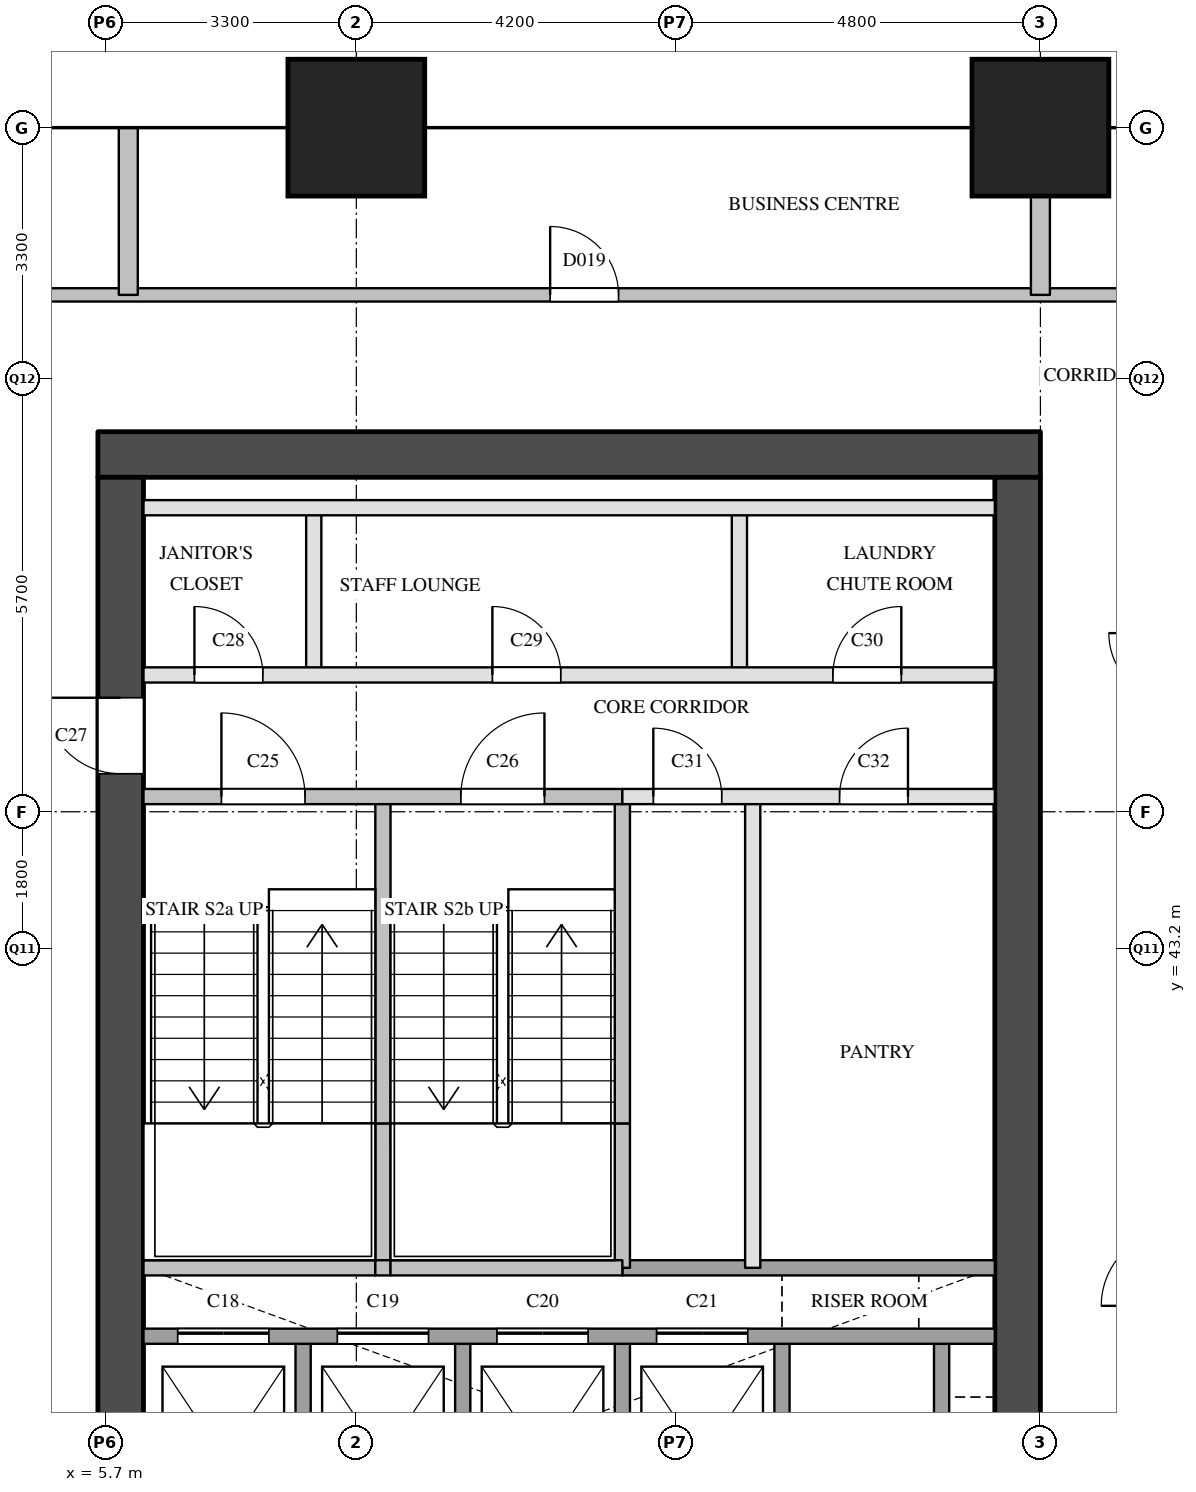
"""IFC4 building model, lengths in metres.
Left out: names, types, materials, properties, quantities, classifications, styles, units other than length and angle.
Written with IfcOpenShell. Run it as: python <this file> out.ifc"""

import sys

from ifc_helpers import new_model, si_unit, direction, frame, frame_2d, origin, origin_2d, place, context, subcontext, project, spatial, rectangle, extrude, element, fill, save


model = new_model("IFC4")
c1 = context("Model", 3, precision=1e-05, world=origin(), true_north=direction((0.0, 1.0)))
c2 = subcontext(c1, "Body", "Model", "MODEL_VIEW")
j1 = project(units=[si_unit("LENGTHUNIT", "METRE"), si_unit("PLANEANGLEUNIT", "RADIAN")], contexts=[c1])
p1 = place(None, origin())
s1 = spatial("IfcSite", under=j1, at=p1, CompositionType="ELEMENT")
p2 = place(p1, origin())
s2 = spatial("IfcBuilding", under=s1, at=p2, CompositionType="ELEMENT")
p3 = place(p2, frame((0.0, 0.0, 115.8)))
s3 = spatial("IfcBuildingStorey", under=s2, at=p3, CompositionType="ELEMENT", Elevation=115.8)
for number, where, z_axis, x_axis in (
    (1, (9.0, 54.0, 0.0), (0.0, 0.0, 1.0), (1.0, 0.0, 0.0)),
    (2, (18.0, 54.0, 0.0), (0.0, 0.0, 1.0), (1.0, 0.0, 0.0)),
):
    element("IfcColumn", number, at=place(p3, frame(where, z_axis=z_axis, x_axis=x_axis)), inside=s3, PredefinedType="COLUMN", context=c2, shape_type="SweptSolid", body=[
        extrude(rectangle(XDim=1.8, YDim=1.8, at=origin_2d()), origin(), (0.0, 0.0, 1.0), 3.8),
    ])
p4 = place(p3, frame((5.6, 49.7, 0.0), z_axis=(0.0, 0.0, 1.0), x_axis=(1.0, 0.0, 0.0)))
e3 = element("IfcWall", 3, at=p4, inside=s3, PredefinedType="SHEAR", context=c2, shape_type="SweptSolid", body=[
    extrude(rectangle(XDim=12.4, YDim=0.6, at=frame_2d((6.2, 0.0))), origin(), (0.0, 0.0, 1.0), 3.5),
])
p5 = place(p3, frame((5.9, 29.1, 0.0), z_axis=(0.0, 0.0, 1.0), x_axis=(0.0, 1.0, 0.0)))
e4 = element("IfcWall", 4, at=p5, inside=s3, PredefinedType="SHEAR", context=c2, shape_type="SweptSolid", body=[
    extrude(rectangle(XDim=20.3, YDim=0.6, at=frame_2d((10.15, 0.0))), origin(), (0.0, 0.0, 1.0), 3.5),
])
p6 = place(p5, frame((3.6, 0.0, 0.0)))
e5 = element("IfcOpeningElement", 5, at=p6, cuts=e4, PredefinedType="OPENING", context=c2, shape_type="SweptSolid", body=[
    extrude(rectangle(XDim=1.8, YDim=2.1, at=frame_2d((0.9, 1.05))), frame((0.0, 0.31, 0.0), z_axis=(0.0, -1.0, 0.0), x_axis=(1.0, 0.0, 0.0)), (0.0, 0.0, 1.0), 0.62),
])
p7 = place(p5, frame((16.4, 0.0, 0.0)))
e6 = element("IfcOpeningElement", 6, at=p7, cuts=e4, PredefinedType="OPENING", context=c2, shape_type="SweptSolid", body=[
    extrude(rectangle(XDim=1.0, YDim=2.1, at=frame_2d((0.5, 1.05))), frame((0.0, 0.31, 0.0), z_axis=(0.0, -1.0, 0.0), x_axis=(1.0, 0.0, 0.0)), (0.0, 0.0, 1.0), 0.62),
])
p8 = place(p3, frame((17.7, 29.1, 0.0), z_axis=(0.0, 0.0, 1.0), x_axis=(0.0, 1.0, 0.0)))
e7 = element("IfcWall", 7, at=p8, inside=s3, PredefinedType="SHEAR", context=c2, shape_type="SweptSolid", body=[
    extrude(rectangle(XDim=20.3, YDim=0.6, at=frame_2d((10.15, 0.0))), origin(), (0.0, 0.0, 1.0), 3.5),
])
p9 = place(p8, frame((1.25, 0.0, 0.0)))
e8 = element("IfcOpeningElement", 8, at=p9, cuts=e7, PredefinedType="OPENING", context=c2, shape_type="SweptSolid", body=[
    extrude(rectangle(XDim=0.7, YDim=2.1, at=frame_2d((0.35, 1.05))), frame((0.0, 0.31, 0.0), z_axis=(0.0, -1.0, 0.0), x_axis=(1.0, 0.0, 0.0)), (0.0, 0.0, 1.0), 0.62),
])
p10 = place(p8, frame((7.05, 0.0, 0.0)))
e9 = element("IfcOpeningElement", 9, at=p10, cuts=e7, PredefinedType="OPENING", context=c2, shape_type="SweptSolid", body=[
    extrude(rectangle(XDim=0.7, YDim=2.1, at=frame_2d((0.35, 1.05))), frame((0.0, 0.31, 0.0), z_axis=(0.0, -1.0, 0.0), x_axis=(1.0, 0.0, 0.0)), (0.0, 0.0, 1.0), 0.62),
])
p11 = place(p3, frame((8.3, 34.9, 0.0), z_axis=(0.0, 0.0, 1.0), x_axis=(0.0, 1.0, 0.0)))
e10 = element("IfcWall", 10, at=p11, inside=s3, PredefinedType="SOLIDWALL", context=c2, shape_type="SweptSolid", body=[
    extrude(rectangle(XDim=3.2, YDim=0.2, at=frame_2d((1.6, 0.0))), origin(), (0.0, 0.0, 1.0), 3.5),
])
p12 = place(p3, frame((8.44, 46.8, 0.0), z_axis=(0.0, 0.0, 1.0), x_axis=(0.0, 1.0, 0.0)))
e11 = element("IfcWall", 11, at=p12, inside=s3, PredefinedType="PARTITIONING", context=c2, shape_type="SweptSolid", body=[
    extrude(rectangle(XDim=2.2, YDim=0.2, at=frame_2d((1.1, 0.0))), origin(), (0.0, 0.0, 1.0), 3.5),
])
p13 = place(p3, frame((9.35, 39.0, 0.0), z_axis=(0.0, 0.0, 1.0), x_axis=(0.0, 1.0, 0.0)))
e12 = element("IfcWall", 12, at=p13, inside=s3, PredefinedType="SOLIDWALL", context=c2, shape_type="SweptSolid", body=[
    extrude(rectangle(XDim=1.9, YDim=0.2, at=frame_2d((0.95, 0.0))), origin(), (0.0, 0.0, 1.0), 3.5),
])
p14 = place(p3, frame((9.35, 40.9, 0.0), z_axis=(0.0, 0.0, 1.0), x_axis=(0.0, 1.0, 0.0)))
e13 = element("IfcWall", 13, at=p14, inside=s3, PredefinedType="SOLIDWALL", context=c2, shape_type="SweptSolid", body=[
    extrude(rectangle(XDim=4.3, YDim=0.2, at=frame_2d((2.15, 0.0))), origin(), (0.0, 0.0, 1.0), 3.5),
])
for number, where, z_axis, x_axis in (
    (14, (10.4, 34.9, 0.0), (0.0, 0.0, 1.0), (0.0, 1.0, 0.0)),
    (15, (12.5, 34.9, 0.0), (0.0, 0.0, 1.0), (0.0, 1.0, 0.0)),
):
    element("IfcWall", number, at=place(p3, frame(where, z_axis=z_axis, x_axis=x_axis)), inside=s3, PredefinedType="SOLIDWALL", context=c2, shape_type="SweptSolid", body=[
        extrude(rectangle(XDim=3.2, YDim=0.2, at=frame_2d((1.6, 0.0))), origin(), (0.0, 0.0, 1.0), 3.5),
    ])
p15 = place(p3, frame((12.5, 39.0, 0.0), z_axis=(0.0, 0.0, 1.0), x_axis=(0.0, 1.0, 0.0)))
e16 = element("IfcWall", 16, at=p15, inside=s3, PredefinedType="SOLIDWALL", context=c2, shape_type="SweptSolid", body=[
    extrude(rectangle(XDim=1.9, YDim=0.2, at=frame_2d((0.95, 0.0))), origin(), (0.0, 0.0, 1.0), 3.5),
])
p16 = place(p3, frame((12.5, 40.9, 0.0), z_axis=(0.0, 0.0, 1.0), x_axis=(0.0, 1.0, 0.0)))
e17 = element("IfcWall", 17, at=p16, inside=s3, PredefinedType="SOLIDWALL", context=c2, shape_type="SweptSolid", body=[
    extrude(rectangle(XDim=4.3, YDim=0.2, at=frame_2d((2.15, 0.0))), origin(), (0.0, 0.0, 1.0), 3.5),
])
p17 = place(p3, frame((14.04, 46.8, 0.0), z_axis=(0.0, 0.0, 1.0), x_axis=(0.0, 1.0, 0.0)))
e18 = element("IfcWall", 18, at=p17, inside=s3, PredefinedType="PARTITIONING", context=c2, shape_type="SweptSolid", body=[
    extrude(rectangle(XDim=2.2, YDim=0.2, at=frame_2d((1.1, 0.0))), origin(), (0.0, 0.0, 1.0), 3.5),
])
p18 = place(p3, frame((14.215, 39.0, 0.0), z_axis=(0.0, 0.0, 1.0), x_axis=(0.0, 1.0, 0.0)))
e19 = element("IfcWall", 19, at=p18, inside=s3, PredefinedType="PARTITIONING", context=c2, shape_type="SweptSolid", body=[
    extrude(rectangle(XDim=6.2, YDim=0.2, at=frame_2d((3.1, 0.0))), origin(), (0.0, 0.0, 1.0), 3.5),
])
for number, where, z_axis, x_axis in (
    (20, (14.6, 34.9, 0.0), (0.0, 0.0, 1.0), (0.0, 1.0, 0.0)),
    (21, (16.7, 34.9, 0.0), (0.0, 0.0, 1.0), (0.0, 1.0, 0.0)),
):
    element("IfcWall", number, at=place(p3, frame(where, z_axis=z_axis, x_axis=x_axis)), inside=s3, PredefinedType="SOLIDWALL", context=c2, shape_type="SweptSolid", body=[
        extrude(rectangle(XDim=3.2, YDim=0.2, at=frame_2d((1.6, 0.0))), origin(), (0.0, 0.0, 1.0), 3.5),
    ])
p19 = place(p3, frame((6.2, 38.1, 0.0), z_axis=(0.0, 0.0, 1.0), x_axis=(1.0, 0.0, 0.0)))
e22 = element("IfcWall", 22, at=p19, inside=s3, PredefinedType="SOLIDWALL", context=c2, shape_type="SweptSolid", body=[
    extrude(rectangle(XDim=11.2, YDim=0.2, at=frame_2d((5.6, 0.0))), origin(), (0.0, 0.0, 1.0), 3.5),
])
p20 = place(p19, frame((0.45, 0.0, 0.0)))
e23 = element("IfcOpeningElement", 23, at=p20, cuts=e22, PredefinedType="OPENING", context=c2, shape_type="SweptSolid", body=[
    extrude(rectangle(XDim=1.2, YDim=2.1, at=frame_2d((0.6, 1.05))), frame((0.0, 0.11, 0.0), z_axis=(0.0, -1.0, 0.0), x_axis=(1.0, 0.0, 0.0)), (0.0, 0.0, 1.0), 0.22),
])
p21 = place(p19, frame((2.55, 0.0, 0.0)))
e24 = element("IfcOpeningElement", 24, at=p21, cuts=e22, PredefinedType="OPENING", context=c2, shape_type="SweptSolid", body=[
    extrude(rectangle(XDim=1.2, YDim=2.1, at=frame_2d((0.6, 1.05))), frame((0.0, 0.11, 0.0), z_axis=(0.0, -1.0, 0.0), x_axis=(1.0, 0.0, 0.0)), (0.0, 0.0, 1.0), 0.22),
])
p22 = place(p19, frame((4.65, 0.0, 0.0)))
e25 = element("IfcOpeningElement", 25, at=p22, cuts=e22, PredefinedType="OPENING", context=c2, shape_type="SweptSolid", body=[
    extrude(rectangle(XDim=1.2, YDim=2.1, at=frame_2d((0.6, 1.05))), frame((0.0, 0.11, 0.0), z_axis=(0.0, -1.0, 0.0), x_axis=(1.0, 0.0, 0.0)), (0.0, 0.0, 1.0), 0.22),
])
p23 = place(p19, frame((6.75, 0.0, 0.0)))
e26 = element("IfcOpeningElement", 26, at=p23, cuts=e22, PredefinedType="OPENING", context=c2, shape_type="SweptSolid", body=[
    extrude(rectangle(XDim=1.2, YDim=2.1, at=frame_2d((0.6, 1.05))), frame((0.0, 0.11, 0.0), z_axis=(0.0, -1.0, 0.0), x_axis=(1.0, 0.0, 0.0)), (0.0, 0.0, 1.0), 0.22),
])
p24 = place(p3, frame((12.5, 39.0, 0.0), z_axis=(0.0, 0.0, 1.0), x_axis=(1.0, 0.0, 0.0)))
e27 = element("IfcWall", 27, at=p24, inside=s3, PredefinedType="SOLIDWALL", context=c2, shape_type="SweptSolid", body=[
    extrude(rectangle(XDim=4.9, YDim=0.2, at=frame_2d((2.45, 0.0))), origin(), (0.0, 0.0, 1.0), 3.5),
])
p25 = place(p3, frame((6.2, 39.0, 0.0), z_axis=(0.0, 0.0, 1.0), x_axis=(1.0, 0.0, 0.0)))
e28 = element("IfcWall", 28, at=p25, inside=s3, PredefinedType="SOLIDWALL", context=c2, shape_type="SweptSolid", body=[
    extrude(rectangle(XDim=3.05, YDim=0.2, at=frame_2d((1.525, 0.0))), origin(), (0.0, 0.0, 1.0), 3.5),
])
p26 = place(p3, frame((9.25, 39.0, 0.0), z_axis=(0.0, 0.0, 1.0), x_axis=(1.0, 0.0, 0.0)))
e29 = element("IfcWall", 29, at=p26, inside=s3, PredefinedType="SOLIDWALL", context=c2, shape_type="SweptSolid", body=[
    extrude(rectangle(XDim=0.2, YDim=0.2, at=frame_2d((0.1, 0.0))), origin(), (0.0, 0.0, 1.0), 3.5),
])
p27 = place(p3, frame((9.45, 39.0, 0.0), z_axis=(0.0, 0.0, 1.0), x_axis=(1.0, 0.0, 0.0)))
e30 = element("IfcWall", 30, at=p27, inside=s3, PredefinedType="SOLIDWALL", context=c2, shape_type="SweptSolid", body=[
    extrude(rectangle(XDim=3.05, YDim=0.2, at=frame_2d((1.525, 0.0))), origin(), (0.0, 0.0, 1.0), 3.5),
])
p28 = place(p3, frame((12.5, 45.2, 0.0), z_axis=(0.0, 0.0, 1.0), x_axis=(1.0, 0.0, 0.0)))
e31 = element("IfcWall", 31, at=p28, inside=s3, PredefinedType="PARTITIONING", context=c2, shape_type="SweptSolid", body=[
    extrude(rectangle(XDim=4.9, YDim=0.2, at=frame_2d((2.45, 0.0))), origin(), (0.0, 0.0, 1.0), 3.5),
])
p29 = place(p28, frame((0.407, 0.0, 0.0)))
e32 = element("IfcOpeningElement", 32, at=p29, cuts=e31, PredefinedType="OPENING", context=c2, shape_type="SweptSolid", body=[
    extrude(rectangle(XDim=0.9, YDim=2.1, at=frame_2d((0.45, 1.05))), frame((0.0, 0.11, 0.0), z_axis=(0.0, -1.0, 0.0), x_axis=(1.0, 0.0, 0.0)), (0.0, 0.0, 1.0), 0.22),
])
p30 = place(p28, frame((2.857, 0.0, 0.0)))
e33 = element("IfcOpeningElement", 33, at=p30, cuts=e31, PredefinedType="OPENING", context=c2, shape_type="SweptSolid", body=[
    extrude(rectangle(XDim=0.9, YDim=2.1, at=frame_2d((0.45, 1.05))), frame((0.0, 0.11, 0.0), z_axis=(0.0, -1.0, 0.0), x_axis=(1.0, 0.0, 0.0)), (0.0, 0.0, 1.0), 0.22),
])
p31 = place(p3, frame((6.2, 45.2, 0.0), z_axis=(0.0, 0.0, 1.0), x_axis=(1.0, 0.0, 0.0)))
e34 = element("IfcWall", 34, at=p31, inside=s3, PredefinedType="SOLIDWALL", context=c2, shape_type="SweptSolid", body=[
    extrude(rectangle(XDim=6.3, YDim=0.2, at=frame_2d((3.15, 0.0))), origin(), (0.0, 0.0, 1.0), 3.5),
])
p32 = place(p31, frame((1.025, 0.0, 0.0)))
e35 = element("IfcOpeningElement", 35, at=p32, cuts=e34, PredefinedType="OPENING", context=c2, shape_type="SweptSolid", body=[
    extrude(rectangle(XDim=1.1, YDim=2.1, at=frame_2d((0.55, 1.05))), frame((0.0, 0.11, 0.0), z_axis=(0.0, -1.0, 0.0), x_axis=(1.0, 0.0, 0.0)), (0.0, 0.0, 1.0), 0.22),
])
p33 = place(p31, frame((4.175, 0.0, 0.0)))
e36 = element("IfcOpeningElement", 36, at=p33, cuts=e34, PredefinedType="OPENING", context=c2, shape_type="SweptSolid", body=[
    extrude(rectangle(XDim=1.1, YDim=2.1, at=frame_2d((0.55, 1.05))), frame((0.0, 0.11, 0.0), z_axis=(0.0, -1.0, 0.0), x_axis=(1.0, 0.0, 0.0)), (0.0, 0.0, 1.0), 0.22),
])
p34 = place(p3, frame((6.2, 46.8, 0.0), z_axis=(0.0, 0.0, 1.0), x_axis=(1.0, 0.0, 0.0)))
e37 = element("IfcWall", 37, at=p34, inside=s3, PredefinedType="PARTITIONING", context=c2, shape_type="SweptSolid", body=[
    extrude(rectangle(XDim=11.2, YDim=0.2, at=frame_2d((5.6, 0.0))), origin(), (0.0, 0.0, 1.0), 3.5),
])
p35 = place(p34, frame((0.67, 0.0, 0.0)))
e38 = element("IfcOpeningElement", 38, at=p35, cuts=e37, PredefinedType="OPENING", context=c2, shape_type="SweptSolid", body=[
    extrude(rectangle(XDim=0.9, YDim=2.1, at=frame_2d((0.45, 1.05))), frame((0.0, 0.11, 0.0), z_axis=(0.0, -1.0, 0.0), x_axis=(1.0, 0.0, 0.0)), (0.0, 0.0, 1.0), 0.22),
])
p36 = place(p34, frame((4.59, 0.0, 0.0)))
e39 = element("IfcOpeningElement", 39, at=p36, cuts=e37, PredefinedType="OPENING", context=c2, shape_type="SweptSolid", body=[
    extrude(rectangle(XDim=0.9, YDim=2.1, at=frame_2d((0.45, 1.05))), frame((0.0, 0.11, 0.0), z_axis=(0.0, -1.0, 0.0), x_axis=(1.0, 0.0, 0.0)), (0.0, 0.0, 1.0), 0.22),
])
p37 = place(p34, frame((9.07, 0.0, 0.0)))
e40 = element("IfcOpeningElement", 40, at=p37, cuts=e37, PredefinedType="OPENING", context=c2, shape_type="SweptSolid", body=[
    extrude(rectangle(XDim=0.9, YDim=2.1, at=frame_2d((0.45, 1.05))), frame((0.0, 0.11, 0.0), z_axis=(0.0, -1.0, 0.0), x_axis=(1.0, 0.0, 0.0)), (0.0, 0.0, 1.0), 0.22),
])
p38 = place(p3, frame((6.2, 49.0, 0.0), z_axis=(0.0, 0.0, 1.0), x_axis=(1.0, 0.0, 0.0)))
e41 = element("IfcWall", 41, at=p38, inside=s3, PredefinedType="PARTITIONING", context=c2, shape_type="SweptSolid", body=[
    extrude(rectangle(XDim=11.2, YDim=0.2, at=frame_2d((5.6, 0.0))), origin(), (0.0, 0.0, 1.0), 3.5),
])
p39 = place(p3, frame((3.8, 51.8, 0.0), z_axis=(0.0, 0.0, 1.0), x_axis=(1.0, 0.0, 0.0)))
e42 = element("IfcWall", 42, at=p39, inside=s3, PredefinedType="PARTITIONING", context=c2, shape_type="SweptSolid", body=[
    extrude(rectangle(XDim=16.0, YDim=0.175, at=frame_2d((8.0, 0.0))), origin(), (0.0, 0.0, 1.0), 3.5),
])
p40 = place(p39, frame((7.75, 0.0, 0.0)))
e43 = element("IfcOpeningElement", 43, at=p40, cuts=e42, PredefinedType="OPENING", context=c2, shape_type="SweptSolid", body=[
    extrude(rectangle(XDim=0.9, YDim=2.1, at=frame_2d((0.45, 1.05))), frame((0.0, 0.097, 0.0), z_axis=(0.0, -1.0, 0.0), x_axis=(1.0, 0.0, 0.0)), (0.0, 0.0, 1.0), 0.195),
])
p41 = place(p3, frame((6.0, 51.8, 0.0), z_axis=(0.0, 0.0, 1.0), x_axis=(0.0, 1.0, 0.0)))
e44 = element("IfcWall", 44, at=p41, inside=s3, PredefinedType="PARTITIONING", context=c2, shape_type="SweptSolid", body=[
    extrude(rectangle(XDim=2.2, YDim=0.25, at=frame_2d((1.1, 0.0))), origin(), (0.0, 0.0, 1.0), 2.5),
])
p42 = place(p3, frame((18.0, 51.8, 0.0), z_axis=(0.0, 0.0, 1.0), x_axis=(0.0, 1.0, 0.0)))
e45 = element("IfcWall", 45, at=p42, inside=s3, PredefinedType="PARTITIONING", context=c2, shape_type="SweptSolid", body=[
    extrude(rectangle(XDim=2.2, YDim=0.25, at=frame_2d((1.1, 0.0))), origin(), (0.0, 0.0, 1.0), 3.5),
])
p43 = place(p20, origin())
e46 = element("IfcDoor", 46, at=p43, inside=s3, OperationType="SLIDING_TO_LEFT", PredefinedType="DOOR", context=c2, shape_type="SweptSolid", body=[
    extrude(rectangle(XDim=1.2, YDim=2.1, at=frame_2d((0.6, 1.05))), frame((0.0, 0.025, 0.0), z_axis=(0.0, -1.0, 0.0), x_axis=(1.0, 0.0, 0.0)), (0.0, 0.0, 1.0), 0.05),
])
fill(e23, e46)
p44 = place(p21, origin())
e47 = element("IfcDoor", 47, at=p44, inside=s3, OperationType="SLIDING_TO_LEFT", PredefinedType="DOOR", context=c2, shape_type="SweptSolid", body=[
    extrude(rectangle(XDim=1.2, YDim=2.1, at=frame_2d((0.6, 1.05))), frame((0.0, 0.025, 0.0), z_axis=(0.0, -1.0, 0.0), x_axis=(1.0, 0.0, 0.0)), (0.0, 0.0, 1.0), 0.05),
])
fill(e24, e47)
p45 = place(p22, origin())
e48 = element("IfcDoor", 48, at=p45, inside=s3, OperationType="SLIDING_TO_LEFT", PredefinedType="DOOR", context=c2, shape_type="SweptSolid", body=[
    extrude(rectangle(XDim=1.2, YDim=2.1, at=frame_2d((0.6, 1.05))), frame((0.0, 0.025, 0.0), z_axis=(0.0, -1.0, 0.0), x_axis=(1.0, 0.0, 0.0)), (0.0, 0.0, 1.0), 0.05),
])
fill(e25, e48)
p46 = place(p23, origin())
e49 = element("IfcDoor", 49, at=p46, inside=s3, OperationType="SLIDING_TO_LEFT", PredefinedType="DOOR", context=c2, shape_type="SweptSolid", body=[
    extrude(rectangle(XDim=1.2, YDim=2.1, at=frame_2d((0.6, 1.05))), frame((0.0, 0.025, 0.0), z_axis=(0.0, -1.0, 0.0), x_axis=(1.0, 0.0, 0.0)), (0.0, 0.0, 1.0), 0.05),
])
fill(e26, e49)
p47 = place(p32, origin())
e50 = element("IfcDoor", 50, at=p47, inside=s3, OperationType="SINGLE_SWING_LEFT", PredefinedType="DOOR", context=c2, shape_type="SweptSolid", body=[
    extrude(rectangle(XDim=1.1, YDim=2.1, at=frame_2d((0.55, 1.05))), frame((0.0, 0.025, 0.0), z_axis=(0.0, -1.0, 0.0), x_axis=(1.0, 0.0, 0.0)), (0.0, 0.0, 1.0), 0.05),
])
fill(e35, e50)
p48 = place(p33, origin())
e51 = element("IfcDoor", 51, at=p48, inside=s3, OperationType="SINGLE_SWING_RIGHT", PredefinedType="DOOR", context=c2, shape_type="SweptSolid", body=[
    extrude(rectangle(XDim=1.1, YDim=2.1, at=frame_2d((0.55, 1.05))), frame((0.0, 0.025, 0.0), z_axis=(0.0, -1.0, 0.0), x_axis=(1.0, 0.0, 0.0)), (0.0, 0.0, 1.0), 0.05),
])
fill(e36, e51)
p49 = place(p7, origin())
e52 = element("IfcDoor", 52, at=p49, inside=s3, OperationType="SINGLE_SWING_RIGHT", PredefinedType="DOOR", context=c2, shape_type="SweptSolid", body=[
    extrude(rectangle(XDim=1.0, YDim=2.1, at=frame_2d((0.5, 1.05))), frame((0.0, 0.025, 0.0), z_axis=(0.0, -1.0, 0.0), x_axis=(1.0, 0.0, 0.0)), (0.0, 0.0, 1.0), 0.05),
])
fill(e6, e52)
p50 = place(p35, origin())
e53 = element("IfcDoor", 53, at=p50, inside=s3, OperationType="SINGLE_SWING_LEFT", PredefinedType="DOOR", context=c2, shape_type="SweptSolid", body=[
    extrude(rectangle(XDim=0.9, YDim=2.1, at=frame_2d((0.45, 1.05))), frame((0.0, 0.025, 0.0), z_axis=(0.0, -1.0, 0.0), x_axis=(1.0, 0.0, 0.0)), (0.0, 0.0, 1.0), 0.05),
])
fill(e38, e53)
p51 = place(p36, origin())
e54 = element("IfcDoor", 54, at=p51, inside=s3, OperationType="SINGLE_SWING_LEFT", PredefinedType="DOOR", context=c2, shape_type="SweptSolid", body=[
    extrude(rectangle(XDim=0.9, YDim=2.1, at=frame_2d((0.45, 1.05))), frame((0.0, 0.025, 0.0), z_axis=(0.0, -1.0, 0.0), x_axis=(1.0, 0.0, 0.0)), (0.0, 0.0, 1.0), 0.05),
])
fill(e39, e54)
p52 = place(p37, origin())
e55 = element("IfcDoor", 55, at=p52, inside=s3, OperationType="SINGLE_SWING_RIGHT", PredefinedType="DOOR", context=c2, shape_type="SweptSolid", body=[
    extrude(rectangle(XDim=0.9, YDim=2.1, at=frame_2d((0.45, 1.05))), frame((0.0, 0.025, 0.0), z_axis=(0.0, -1.0, 0.0), x_axis=(1.0, 0.0, 0.0)), (0.0, 0.0, 1.0), 0.05),
])
fill(e40, e55)
p53 = place(p29, origin())
e56 = element("IfcDoor", 56, at=p53, inside=s3, OperationType="SINGLE_SWING_LEFT", PredefinedType="DOOR", context=c2, shape_type="SweptSolid", body=[
    extrude(rectangle(XDim=0.9, YDim=2.1, at=frame_2d((0.45, 1.05))), frame((0.0, 0.025, 0.0), z_axis=(0.0, -1.0, 0.0), x_axis=(1.0, 0.0, 0.0)), (0.0, 0.0, 1.0), 0.05),
])
fill(e32, e56)
p54 = place(p30, origin())
e57 = element("IfcDoor", 57, at=p54, inside=s3, OperationType="SINGLE_SWING_RIGHT", PredefinedType="DOOR", context=c2, shape_type="SweptSolid", body=[
    extrude(rectangle(XDim=0.9, YDim=2.1, at=frame_2d((0.45, 1.05))), frame((0.0, 0.025, 0.0), z_axis=(0.0, -1.0, 0.0), x_axis=(1.0, 0.0, 0.0)), (0.0, 0.0, 1.0), 0.05),
])
fill(e33, e57)
p55 = place(p40, origin())
e58 = element("IfcDoor", 58, at=p55, inside=s3, OperationType="SINGLE_SWING_LEFT", PredefinedType="DOOR", context=c2, shape_type="SweptSolid", body=[
    extrude(rectangle(XDim=0.9, YDim=2.1, at=frame_2d((0.45, 1.05))), frame((0.0, 0.025, 0.0), z_axis=(0.0, -1.0, 0.0), x_axis=(1.0, 0.0, 0.0)), (0.0, 0.0, 1.0), 0.05),
])
fill(e43, e58)
save(model, sys.argv[1])
